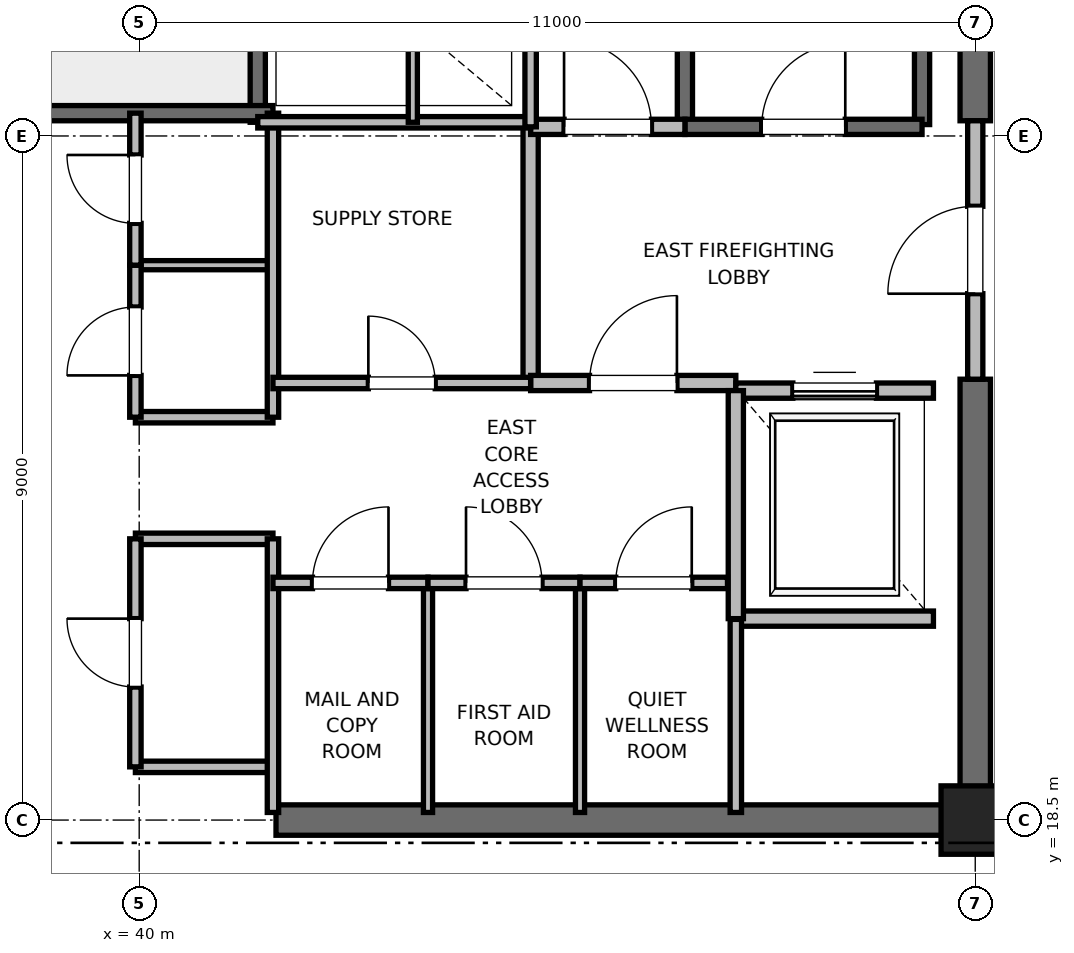
"""IFC4 building model, lengths in metres.
Left out: names, types, materials, properties, quantities, classifications, styles, units other than length and angle.
Written with IfcOpenShell. Run it as: python <this file> out.ifc"""

import sys

from ifc_helpers import new_model, si_unit, direction, frame, frame_2d, origin, origin_2d, place, context, subcontext, project, spatial, rectangle, extrude, element, fill, save


model = new_model("IFC4")
c1 = context("Model", 3, precision=1e-05, world=origin(), true_north=direction((0.0, 1.0)))
c2 = subcontext(c1, "Body", "Model", "MODEL_VIEW")
j1 = project(units=[si_unit("LENGTHUNIT", "METRE"), si_unit("PLANEANGLEUNIT", "RADIAN")], contexts=[c1])
p1 = place(None, origin())
s1 = spatial("IfcSite", under=j1, at=p1, CompositionType="ELEMENT")
p2 = place(p1, origin())
s2 = spatial("IfcBuilding", under=s1, at=p2, CompositionType="ELEMENT")
p3 = place(p2, frame((0.0, 0.0, 330.8)))
s3 = spatial("IfcBuildingStorey", under=s2, at=p3, CompositionType="ELEMENT", Elevation=330.8)
p4 = place(p3, frame((51.0, 18.5, 0.0), z_axis=(0.0, 0.0, 1.0), x_axis=(1.0, 0.0, 0.0)))
e1 = element("IfcColumn", 1, at=p4, inside=s3, PredefinedType="PILASTER", context=c2, shape_type="SweptSolid", body=[
    extrude(rectangle(XDim=0.9, YDim=0.9, at=origin_2d()), origin(), (0.0, 0.0, 1.0), 4.0),
])
p5 = place(p3, frame((41.8, 18.5, 0.0), z_axis=(0.0, 0.0, 1.0), x_axis=(1.0, 0.0, 0.0)))
e2 = element("IfcWall", 2, at=p5, inside=s3, PredefinedType="SHEAR", context=c2, shape_type="SweptSolid", body=[
    extrude(rectangle(XDim=9.2, YDim=0.4, at=frame_2d((4.6, 0.0))), origin(), (0.0, 0.0, 1.0), 3.785),
])
p6 = place(p3, frame((51.0, 18.5, 0.0), z_axis=(0.0, 0.0, 1.0), x_axis=(0.0, 1.0, 0.0)))
e3 = element("IfcWall", 3, at=p6, inside=s3, PredefinedType="SHEAR", context=c2, shape_type="SweptSolid", body=[
    extrude(rectangle(XDim=5.8, YDim=0.4, at=frame_2d((2.9, 0.0))), origin(), (0.0, 0.0, 1.0), 3.785),
])
p7 = place(p3, frame((51.0, 27.7, 0.0), z_axis=(0.0, 0.0, 1.0), x_axis=(0.0, 1.0, 0.0)))
e4 = element("IfcWall", 4, at=p7, inside=s3, PredefinedType="SHEAR", context=c2, shape_type="SweptSolid", body=[
    extrude(rectangle(XDim=8.8, YDim=0.4, at=frame_2d((4.4, 0.0))), origin(), (0.0, 0.0, 1.0), 3.785),
])
p8 = place(p3, frame((50.3, 27.65, 0.0), z_axis=(0.0, 0.0, 1.0), x_axis=(0.0, 1.0, 0.0)))
e5 = element("IfcWall", 5, at=p8, inside=s3, PredefinedType="SOLIDWALL", context=c2, shape_type="SweptSolid", body=[
    extrude(rectangle(XDim=8.15, YDim=0.2, at=frame_2d((4.075, 0.0))), origin(), (0.0, 0.0, 1.0), 3.785),
])
p9 = place(p3, frame((47.18, 27.62, 0.0), z_axis=(0.0, 0.0, 1.0), x_axis=(0.0, 1.0, 0.0)))
e6 = element("IfcWall", 6, at=p9, inside=s3, PredefinedType="SOLIDWALL", context=c2, shape_type="SweptSolid", body=[
    extrude(rectangle(XDim=8.18, YDim=0.2, at=frame_2d((4.09, 0.0))), origin(), (0.0, 0.0, 1.0), 3.785),
])
p10 = place(p3, frame((47.18, 27.62, 0.0), z_axis=(0.0, 0.0, 1.0), x_axis=(1.0, 0.0, 0.0)))
e7 = element("IfcWall", 7, at=p10, inside=s3, PredefinedType="SOLIDWALL", context=c2, shape_type="SweptSolid", body=[
    extrude(rectangle(XDim=3.12, YDim=0.2, at=frame_2d((1.56, 0.0))), origin(), (0.0, 0.0, 1.0), 3.785),
])
p11 = place(p10, frame((1.01, 0.0, 0.0)))
e8 = element("IfcOpeningElement", 8, at=p11, cuts=e7, PredefinedType="OPENING", context=c2, shape_type="SweptSolid", body=[
    extrude(rectangle(XDim=1.1, YDim=2.15, at=frame_2d((0.55, 1.075))), frame((0.0, 0.1, 0.0), z_axis=(0.0, -1.0, 0.0), x_axis=(1.0, 0.0, 0.0)), (0.0, 0.0, 1.0), 0.2),
])
p12 = place(p3, frame((41.56, 27.68, 0.0), z_axis=(0.0, 0.0, 1.0), x_axis=(0.0, 1.0, 0.0)))
e9 = element("IfcWall", 9, at=p12, inside=s3, PredefinedType="SOLIDWALL", context=c2, shape_type="SweptSolid", body=[
    extrude(rectangle(XDim=8.57, YDim=0.2, at=frame_2d((4.285, 0.0))), origin(), (0.0, 0.0, 1.0), 3.785),
])
p13 = place(p3, frame((38.44, 27.8, 0.0), z_axis=(0.0, 0.0, 1.0), x_axis=(1.0, 0.0, 0.0)))
e10 = element("IfcWall", 10, at=p13, inside=s3, PredefinedType="SOLIDWALL", context=c2, shape_type="SweptSolid", body=[
    extrude(rectangle(XDim=3.32, YDim=0.2, at=frame_2d((1.66, 0.0))), origin(), (0.0, 0.0, 1.0), 3.785),
])
p14 = place(p3, frame((45.15, 24.25, 0.0), z_axis=(0.0, 0.0, 1.0), x_axis=(0.0, 1.0, 0.0)))
e11 = element("IfcWall", 11, at=p14, inside=s3, PredefinedType="PARTITIONING", context=c2, shape_type="SweptSolid", body=[
    extrude(rectangle(XDim=3.37, YDim=0.2, at=frame_2d((1.685, 0.0))), origin(), (0.0, 0.0, 1.0), 3.785),
])
p15 = place(p3, frame((45.15, 24.25, 0.0), z_axis=(0.0, 0.0, 1.0), x_axis=(1.0, 0.0, 0.0)))
e12 = element("IfcWall", 12, at=p15, inside=s3, PredefinedType="PARTITIONING", context=c2, shape_type="SweptSolid", body=[
    extrude(rectangle(XDim=2.7, YDim=0.2, at=frame_2d((1.35, 0.0))), origin(), (0.0, 0.0, 1.0), 3.785),
])
p16 = place(p15, frame((0.775, 0.0, 0.0)))
e13 = element("IfcOpeningElement", 13, at=p16, cuts=e12, PredefinedType="OPENING", context=c2, shape_type="SweptSolid", body=[
    extrude(rectangle(XDim=1.15, YDim=2.2, at=frame_2d((0.575, 1.1))), frame((0.0, 0.1, 0.0), z_axis=(0.0, -1.0, 0.0), x_axis=(1.0, 0.0, 0.0)), (0.0, 0.0, 1.0), 0.2),
])
p17 = place(p3, frame((45.15, 27.62, 0.0), z_axis=(0.0, 0.0, 1.0), x_axis=(1.0, 0.0, 0.0)))
e14 = element("IfcWall", 14, at=p17, inside=s3, PredefinedType="PARTITIONING", context=c2, shape_type="SweptSolid", body=[
    extrude(rectangle(XDim=2.03, YDim=0.2, at=frame_2d((1.015, 0.0))), origin(), (0.0, 0.0, 1.0), 3.785),
])
p18 = place(p17, frame((0.44, 0.0, 0.0)))
e15 = element("IfcOpeningElement", 15, at=p18, cuts=e14, PredefinedType="OPENING", context=c2, shape_type="SweptSolid", body=[
    extrude(rectangle(XDim=1.15, YDim=2.2, at=frame_2d((0.575, 1.1))), frame((0.0, 0.1, 0.0), z_axis=(0.0, -1.0, 0.0), x_axis=(1.0, 0.0, 0.0)), (0.0, 0.0, 1.0), 0.2),
])
p19 = place(p3, frame((51.0, 24.3, 0.0), z_axis=(0.0, 0.0, 1.0), x_axis=(0.0, 1.0, 0.0)))
e16 = element("IfcWall", 16, at=p19, inside=s3, PredefinedType="PARTITIONING", context=c2, shape_type="SweptSolid", body=[
    extrude(rectangle(XDim=3.4, YDim=0.2, at=frame_2d((1.7, 0.0))), origin(), (0.0, 0.0, 1.0), 2.865),
])
p20 = place(p19, frame((1.125, 0.0, 0.0)))
e17 = element("IfcOpeningElement", 17, at=p20, cuts=e16, PredefinedType="OPENING", context=c2, shape_type="SweptSolid", body=[
    extrude(rectangle(XDim=1.15, YDim=2.2, at=frame_2d((0.575, 1.1))), frame((0.0, 0.1, 0.0), z_axis=(0.0, -1.0, 0.0), x_axis=(1.0, 0.0, 0.0)), (0.0, 0.0, 1.0), 0.2),
])
p21 = place(p3, frame((47.85, 21.15, 0.0), z_axis=(0.0, 0.0, 1.0), x_axis=(1.0, 0.0, 0.0)))
e18 = element("IfcWall", 18, at=p21, inside=s3, PredefinedType="SOLIDWALL", context=c2, shape_type="SweptSolid", body=[
    extrude(rectangle(XDim=2.6, YDim=0.2, at=frame_2d((1.3, 0.0))), origin(), (0.0, 0.0, 1.0), 3.785),
])
p22 = place(p3, frame((50.45, 24.15, 0.0), z_axis=(0.0, 0.0, 1.0), x_axis=(-1.0, 0.0, 0.0)))
e19 = element("IfcWall", 19, at=p22, inside=s3, PredefinedType="SOLIDWALL", context=c2, shape_type="SweptSolid", body=[
    extrude(rectangle(XDim=2.6, YDim=0.2, at=frame_2d((1.3, 0.0))), origin(), (0.0, 0.0, 1.0), 2.865),
])
p23 = place(p22, frame((0.75, 0.0, 0.0)))
e20 = element("IfcOpeningElement", 20, at=p23, cuts=e19, PredefinedType="OPENING", context=c2, shape_type="SweptSolid", body=[
    extrude(rectangle(XDim=1.1, YDim=2.2, at=frame_2d((0.55, 1.1))), frame((0.0, 0.1, 0.0), z_axis=(0.0, -1.0, 0.0), x_axis=(1.0, 0.0, 0.0)), (0.0, 0.0, 1.0), 0.2),
])
p24 = place(p3, frame((47.85, 24.15, 0.0), z_axis=(0.0, 0.0, 1.0), x_axis=(0.0, -1.0, 0.0)))
e21 = element("IfcWall", 21, at=p24, inside=s3, PredefinedType="SOLIDWALL", context=c2, shape_type="SweptSolid", body=[
    extrude(rectangle(XDim=3.0, YDim=0.2, at=frame_2d((1.5, 0.0))), origin(), (0.0, 0.0, 1.0), 3.785),
])
for number, where, z_axis, x_axis in (
    (22, (39.95, 19.2, 0.0), (0.0, 0.0, 1.0), (1.0, 0.0, 0.0)),
    (23, (39.95, 22.2, 0.0), (0.0, 0.0, 1.0), (1.0, 0.0, 0.0)),
    (24, (39.95, 23.8, 0.0), (0.0, 0.0, 1.0), (1.0, 0.0, 0.0)),
):
    element("IfcWall", number, at=place(p3, frame(where, z_axis=z_axis, x_axis=x_axis)), inside=s3, PredefinedType="PARTITIONING", context=c2, shape_type="SweptSolid", body=[
        extrude(rectangle(XDim=1.81, YDim=0.15, at=frame_2d((0.905, 0.0))), origin(), (0.0, 0.0, 1.0), 2.85),
    ])
p25 = place(p3, frame((39.95, 25.8, 0.0), z_axis=(0.0, 0.0, 1.0), x_axis=(1.0, 0.0, 0.0)))
e25 = element("IfcWall", 25, at=p25, inside=s3, PredefinedType="PARTITIONING", context=c2, shape_type="SweptSolid", body=[
    extrude(rectangle(XDim=1.81, YDim=0.12, at=frame_2d((0.905, 0.0))), origin(), (0.0, 0.0, 1.0), 2.85),
])
p26 = place(p3, frame((41.76, 18.6, 0.0), z_axis=(0.0, 0.0, 1.0), x_axis=(0.0, 1.0, 0.0)))
e26 = element("IfcWall", 26, at=p26, inside=s3, PredefinedType="PARTITIONING", context=c2, shape_type="SweptSolid", body=[
    extrude(rectangle(XDim=3.6, YDim=0.15, at=frame_2d((1.8, 0.0))), origin(), (0.0, 0.0, 1.0), 2.85),
])
p27 = place(p3, frame((41.76, 23.8, 0.0), z_axis=(0.0, 0.0, 1.0), x_axis=(0.0, 1.0, 0.0)))
e27 = element("IfcWall", 27, at=p27, inside=s3, PredefinedType="PARTITIONING", context=c2, shape_type="SweptSolid", body=[
    extrude(rectangle(XDim=4.0, YDim=0.15, at=frame_2d((2.0, 0.0))), origin(), (0.0, 0.0, 1.0), 2.85),
])
p28 = place(p3, frame((39.95, 19.2, 0.0), z_axis=(0.0, 0.0, 1.0), x_axis=(0.0, 1.0, 0.0)))
e28 = element("IfcWall", 28, at=p28, inside=s3, PredefinedType="PARTITIONING", context=c2, shape_type="SweptSolid", body=[
    extrude(rectangle(XDim=3.0, YDim=0.15, at=frame_2d((1.5, 0.0))), origin(), (0.0, 0.0, 1.0), 2.85),
])
p29 = place(p28, frame((1.05, 0.0, 0.0)))
e29 = element("IfcOpeningElement", 29, at=p29, cuts=e28, PredefinedType="OPENING", context=c2, shape_type="SweptSolid", body=[
    extrude(rectangle(XDim=0.9, YDim=2.1, at=frame_2d((0.45, 1.05))), frame((0.0, 0.075, 0.0), z_axis=(0.0, -1.0, 0.0), x_axis=(1.0, 0.0, 0.0)), (0.0, 0.0, 1.0), 0.15),
])
p30 = place(p3, frame((39.95, 23.8, 0.0), z_axis=(0.0, 0.0, 1.0), x_axis=(0.0, 1.0, 0.0)))
e30 = element("IfcWall", 30, at=p30, inside=s3, PredefinedType="PARTITIONING", context=c2, shape_type="SweptSolid", body=[
    extrude(rectangle(XDim=2.0, YDim=0.15, at=frame_2d((1.0, 0.0))), origin(), (0.0, 0.0, 1.0), 2.85),
])
p31 = place(p30, frame((0.55, 0.0, 0.0)))
e31 = element("IfcOpeningElement", 31, at=p31, cuts=e30, PredefinedType="OPENING", context=c2, shape_type="SweptSolid", body=[
    extrude(rectangle(XDim=0.9, YDim=2.1, at=frame_2d((0.45, 1.05))), frame((0.0, 0.075, 0.0), z_axis=(0.0, -1.0, 0.0), x_axis=(1.0, 0.0, 0.0)), (0.0, 0.0, 1.0), 0.15),
])
p32 = place(p3, frame((39.95, 25.8, 0.0), z_axis=(0.0, 0.0, 1.0), x_axis=(0.0, 1.0, 0.0)))
e32 = element("IfcWall", 32, at=p32, inside=s3, PredefinedType="PARTITIONING", context=c2, shape_type="SweptSolid", body=[
    extrude(rectangle(XDim=2.0, YDim=0.15, at=frame_2d((1.0, 0.0))), origin(), (0.0, 0.0, 1.0), 2.85),
])
p33 = place(p32, frame((0.55, 0.0, 0.0)))
e33 = element("IfcOpeningElement", 33, at=p33, cuts=e32, PredefinedType="OPENING", context=c2, shape_type="SweptSolid", body=[
    extrude(rectangle(XDim=0.9, YDim=2.1, at=frame_2d((0.45, 1.05))), frame((0.0, 0.075, 0.0), z_axis=(0.0, -1.0, 0.0), x_axis=(1.0, 0.0, 0.0)), (0.0, 0.0, 1.0), 0.15),
])
p34 = place(p3, frame((41.56, 27.68, 0.0), z_axis=(0.0, 0.0, 1.0), x_axis=(1.0, 0.0, 0.0)))
e34 = element("IfcWall", 34, at=p34, inside=s3, PredefinedType="PARTITIONING", context=c2, shape_type="SweptSolid", body=[
    extrude(rectangle(XDim=3.59, YDim=0.15, at=frame_2d((1.795, 0.0))), origin(), (0.0, 0.0, 1.0), 2.85),
])
p35 = place(p3, frame((47.85, 18.6, 0.0), z_axis=(0.0, 0.0, 1.0), x_axis=(0.0, 1.0, 0.0)))
e35 = element("IfcWall", 35, at=p35, inside=s3, PredefinedType="PARTITIONING", context=c2, shape_type="SweptSolid", body=[
    extrude(rectangle(XDim=2.54, YDim=0.15, at=frame_2d((1.27, 0.0))), origin(), (0.0, 0.0, 1.0), 2.85),
])
for number, where, z_axis, x_axis in (
    (36, (43.8, 18.6, 0.0), (0.0, 0.0, 1.0), (0.0, 1.0, 0.0)),
    (37, (45.8, 18.6, 0.0), (0.0, 0.0, 1.0), (0.0, 1.0, 0.0)),
):
    element("IfcWall", number, at=place(p3, frame(where, z_axis=z_axis, x_axis=x_axis)), inside=s3, PredefinedType="PARTITIONING", context=c2, shape_type="SweptSolid", body=[
        extrude(rectangle(XDim=3.02, YDim=0.12, at=frame_2d((1.51, 0.0))), origin(), (0.0, 0.0, 1.0), 2.85),
    ])
p36 = place(p3, frame((41.76, 21.62, 0.0), z_axis=(0.0, 0.0, 1.0), x_axis=(1.0, 0.0, 0.0)))
e38 = element("IfcWall", 38, at=p36, inside=s3, PredefinedType="PARTITIONING", context=c2, shape_type="SweptSolid", body=[
    extrude(rectangle(XDim=2.04, YDim=0.15, at=frame_2d((1.02, 0.0))), origin(), (0.0, 0.0, 1.0), 2.85),
])
p37 = place(p36, frame((0.52, 0.0, 0.0)))
e39 = element("IfcOpeningElement", 39, at=p37, cuts=e38, PredefinedType="OPENING", context=c2, shape_type="SweptSolid", body=[
    extrude(rectangle(XDim=1.0, YDim=2.15, at=frame_2d((0.5, 1.075))), frame((0.0, 0.075, 0.0), z_axis=(0.0, -1.0, 0.0), x_axis=(1.0, 0.0, 0.0)), (0.0, 0.0, 1.0), 0.15),
])
p38 = place(p3, frame((43.8, 21.62, 0.0), z_axis=(0.0, 0.0, 1.0), x_axis=(1.0, 0.0, 0.0)))
e40 = element("IfcWall", 40, at=p38, inside=s3, PredefinedType="PARTITIONING", context=c2, shape_type="SweptSolid", body=[
    extrude(rectangle(XDim=2.0, YDim=0.15, at=frame_2d((1.0, 0.0))), origin(), (0.0, 0.0, 1.0), 2.85),
])
p39 = place(p38, frame((0.5, 0.0, 0.0)))
e41 = element("IfcOpeningElement", 41, at=p39, cuts=e40, PredefinedType="OPENING", context=c2, shape_type="SweptSolid", body=[
    extrude(rectangle(XDim=1.0, YDim=2.15, at=frame_2d((0.5, 1.075))), frame((0.0, 0.075, 0.0), z_axis=(0.0, -1.0, 0.0), x_axis=(1.0, 0.0, 0.0)), (0.0, 0.0, 1.0), 0.15),
])
p40 = place(p3, frame((45.8, 21.62, 0.0), z_axis=(0.0, 0.0, 1.0), x_axis=(1.0, 0.0, 0.0)))
e42 = element("IfcWall", 42, at=p40, inside=s3, PredefinedType="PARTITIONING", context=c2, shape_type="SweptSolid", body=[
    extrude(rectangle(XDim=1.94, YDim=0.15, at=frame_2d((0.97, 0.0))), origin(), (0.0, 0.0, 1.0), 2.85),
])
p41 = place(p40, frame((0.47, 0.0, 0.0)))
e43 = element("IfcOpeningElement", 43, at=p41, cuts=e42, PredefinedType="OPENING", context=c2, shape_type="SweptSolid", body=[
    extrude(rectangle(XDim=1.0, YDim=2.15, at=frame_2d((0.5, 1.075))), frame((0.0, 0.075, 0.0), z_axis=(0.0, -1.0, 0.0), x_axis=(1.0, 0.0, 0.0)), (0.0, 0.0, 1.0), 0.15),
])
p42 = place(p3, frame((41.76, 24.25, 0.0), z_axis=(0.0, 0.0, 1.0), x_axis=(1.0, 0.0, 0.0)))
e44 = element("IfcWall", 44, at=p42, inside=s3, PredefinedType="PARTITIONING", context=c2, shape_type="SweptSolid", body=[
    extrude(rectangle(XDim=3.39, YDim=0.15, at=frame_2d((1.695, 0.0))), origin(), (0.0, 0.0, 1.0), 2.85),
])
p43 = place(p42, frame((1.255, 0.0, 0.0)))
e45 = element("IfcOpeningElement", 45, at=p43, cuts=e44, PredefinedType="OPENING", context=c2, shape_type="SweptSolid", body=[
    extrude(rectangle(XDim=0.88, YDim=2.1, at=frame_2d((0.44, 1.05))), frame((0.0, 0.075, 0.0), z_axis=(0.0, -1.0, 0.0), x_axis=(1.0, 0.0, 0.0)), (0.0, 0.0, 1.0), 0.15),
])
p44 = place(p3, frame((45.15, 27.62, 0.0), z_axis=(0.0, 0.0, 1.0), x_axis=(0.0, 1.0, 0.0)))
e46 = element("IfcWall", 46, at=p44, inside=s3, PredefinedType="PARTITIONING", context=c2, shape_type="SweptSolid", body=[
    extrude(rectangle(XDim=3.1, YDim=0.15, at=frame_2d((1.55, 0.0))), origin(), (0.0, 0.0, 1.0), 2.85),
])
p45 = place(p3, frame((43.6, 27.68, 0.0), z_axis=(0.0, 0.0, 1.0), x_axis=(0.0, 1.0, 0.0)))
e47 = element("IfcWall", 47, at=p45, inside=s3, PredefinedType="PARTITIONING", context=c2, shape_type="SweptSolid", body=[
    extrude(rectangle(XDim=3.04, YDim=0.12, at=frame_2d((1.52, 0.0))), origin(), (0.0, 0.0, 1.0), 2.85),
])
p46 = place(p11, origin())
e48 = element("IfcDoor", 48, at=p46, inside=s3, OperationType="SINGLE_SWING_RIGHT", PredefinedType="DOOR", context=c2, shape_type="SweptSolid", body=[
    extrude(rectangle(XDim=1.1, YDim=2.15, at=frame_2d((0.55, 1.075))), frame((0.0, 0.025, 0.0), z_axis=(0.0, -1.0, 0.0), x_axis=(1.0, 0.0, 0.0)), (0.0, 0.0, 1.0), 0.05),
])
fill(e8, e48)
p47 = place(p16, origin())
e49 = element("IfcDoor", 49, at=p47, inside=s3, OperationType="SINGLE_SWING_RIGHT", PredefinedType="DOOR", context=c2, shape_type="SweptSolid", body=[
    extrude(rectangle(XDim=1.15, YDim=2.2, at=frame_2d((0.575, 1.1))), frame((0.0, 0.025, 0.0), z_axis=(0.0, -1.0, 0.0), x_axis=(1.0, 0.0, 0.0)), (0.0, 0.0, 1.0), 0.05),
])
fill(e13, e49)
p48 = place(p18, origin())
e50 = element("IfcDoor", 50, at=p48, inside=s3, OperationType="SINGLE_SWING_LEFT", PredefinedType="DOOR", context=c2, shape_type="SweptSolid", body=[
    extrude(rectangle(XDim=1.15, YDim=2.2, at=frame_2d((0.575, 1.1))), frame((0.0, 0.025, 0.0), z_axis=(0.0, -1.0, 0.0), x_axis=(1.0, 0.0, 0.0)), (0.0, 0.0, 1.0), 0.05),
])
fill(e15, e50)
p49 = place(p20, origin())
e51 = element("IfcDoor", 51, at=p49, inside=s3, OperationType="SINGLE_SWING_LEFT", PredefinedType="DOOR", context=c2, shape_type="SweptSolid", body=[
    extrude(rectangle(XDim=1.15, YDim=2.2, at=frame_2d((0.575, 1.1))), frame((0.0, 0.025, 0.0), z_axis=(0.0, -1.0, 0.0), x_axis=(1.0, 0.0, 0.0)), (0.0, 0.0, 1.0), 0.05),
])
fill(e17, e51)
p50 = place(p23, origin())
e52 = element("IfcDoor", 52, at=p50, inside=s3, OperationType="SLIDING_TO_RIGHT", PredefinedType="DOOR", context=c2, shape_type="SweptSolid", body=[
    extrude(rectangle(XDim=1.1, YDim=2.2, at=frame_2d((0.55, 1.1))), frame((0.0, 0.025, 0.0), z_axis=(0.0, -1.0, 0.0), x_axis=(1.0, 0.0, 0.0)), (0.0, 0.0, 1.0), 0.05),
])
fill(e20, e52)
p51 = place(p29, origin())
e53 = element("IfcDoor", 53, at=p51, inside=s3, OperationType="SINGLE_SWING_RIGHT", PredefinedType="DOOR", context=c2, shape_type="SweptSolid", body=[
    extrude(rectangle(XDim=0.9, YDim=2.1, at=frame_2d((0.45, 1.05))), frame((0.0, 0.025, 0.0), z_axis=(0.0, -1.0, 0.0), x_axis=(1.0, 0.0, 0.0)), (0.0, 0.0, 1.0), 0.05),
])
fill(e29, e53)
p52 = place(p31, origin())
e54 = element("IfcDoor", 54, at=p52, inside=s3, OperationType="SINGLE_SWING_LEFT", PredefinedType="DOOR", context=c2, shape_type="SweptSolid", body=[
    extrude(rectangle(XDim=0.9, YDim=2.1, at=frame_2d((0.45, 1.05))), frame((0.0, 0.025, 0.0), z_axis=(0.0, -1.0, 0.0), x_axis=(1.0, 0.0, 0.0)), (0.0, 0.0, 1.0), 0.05),
])
fill(e31, e54)
p53 = place(p33, origin())
e55 = element("IfcDoor", 55, at=p53, inside=s3, OperationType="SINGLE_SWING_RIGHT", PredefinedType="DOOR", context=c2, shape_type="SweptSolid", body=[
    extrude(rectangle(XDim=0.9, YDim=2.1, at=frame_2d((0.45, 1.05))), frame((0.0, 0.025, 0.0), z_axis=(0.0, -1.0, 0.0), x_axis=(1.0, 0.0, 0.0)), (0.0, 0.0, 1.0), 0.05),
])
fill(e33, e55)
p54 = place(p37, origin())
e56 = element("IfcDoor", 56, at=p54, inside=s3, OperationType="SINGLE_SWING_RIGHT", PredefinedType="DOOR", context=c2, shape_type="SweptSolid", body=[
    extrude(rectangle(XDim=1.0, YDim=2.15, at=frame_2d((0.5, 1.075))), frame((0.0, 0.025, 0.0), z_axis=(0.0, -1.0, 0.0), x_axis=(1.0, 0.0, 0.0)), (0.0, 0.0, 1.0), 0.05),
])
fill(e39, e56)
p55 = place(p39, origin())
e57 = element("IfcDoor", 57, at=p55, inside=s3, OperationType="SINGLE_SWING_LEFT", PredefinedType="DOOR", context=c2, shape_type="SweptSolid", body=[
    extrude(rectangle(XDim=1.0, YDim=2.15, at=frame_2d((0.5, 1.075))), frame((0.0, 0.025, 0.0), z_axis=(0.0, -1.0, 0.0), x_axis=(1.0, 0.0, 0.0)), (0.0, 0.0, 1.0), 0.05),
])
fill(e41, e57)
p56 = place(p41, origin())
e58 = element("IfcDoor", 58, at=p56, inside=s3, OperationType="SINGLE_SWING_RIGHT", PredefinedType="DOOR", context=c2, shape_type="SweptSolid", body=[
    extrude(rectangle(XDim=1.0, YDim=2.15, at=frame_2d((0.5, 1.075))), frame((0.0, 0.025, 0.0), z_axis=(0.0, -1.0, 0.0), x_axis=(1.0, 0.0, 0.0)), (0.0, 0.0, 1.0), 0.05),
])
fill(e43, e58)
p57 = place(p43, origin())
e59 = element("IfcDoor", 59, at=p57, inside=s3, OperationType="SINGLE_SWING_LEFT", PredefinedType="DOOR", context=c2, shape_type="SweptSolid", body=[
    extrude(rectangle(XDim=0.88, YDim=2.1, at=frame_2d((0.44, 1.05))), frame((0.0, 0.025, 0.0), z_axis=(0.0, -1.0, 0.0), x_axis=(1.0, 0.0, 0.0)), (0.0, 0.0, 1.0), 0.05),
])
fill(e45, e59)
save(model, sys.argv[1])
